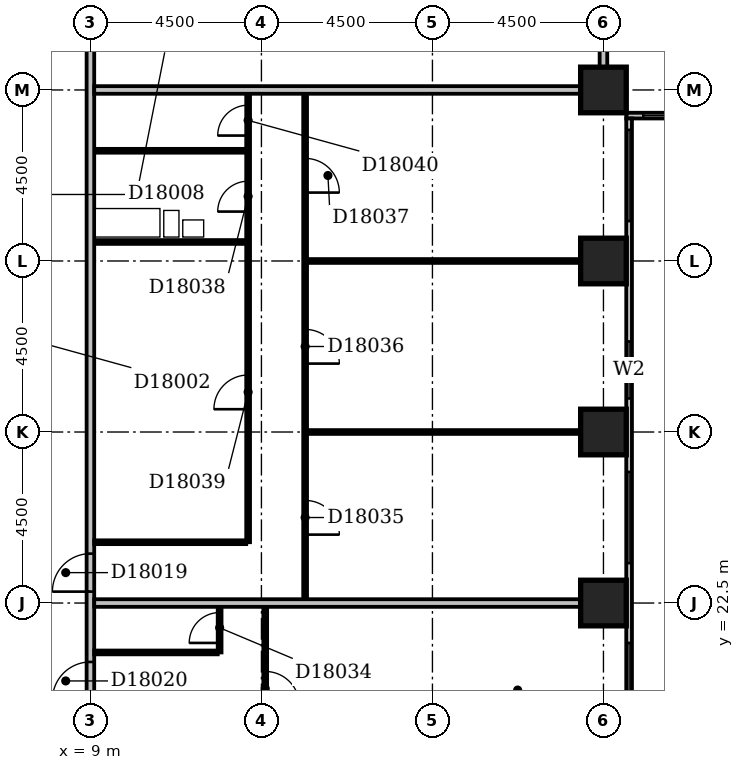
"""IFC4 building model, lengths in metres.
Left out: names, types, materials, properties, quantities, classifications, styles, units other than length and angle.
Written with IfcOpenShell. Run it as: python <this file> out.ifc"""

import sys

from ifc_helpers import new_model, si_unit, direction, frame, frame_2d, origin, origin_2d, place, context, subcontext, project, spatial, rectangle, extrude, element, fill, save


model = new_model("IFC4")
c1 = context("Model", 3, precision=1e-05, world=origin(), true_north=direction((0.0, 1.0)))
c2 = subcontext(c1, "Body", "Model", "MODEL_VIEW")
j1 = project(units=[si_unit("LENGTHUNIT", "METRE"), si_unit("PLANEANGLEUNIT", "RADIAN")], contexts=[c1])
p1 = place(None, origin())
s1 = spatial("IfcSite", under=j1, at=p1, CompositionType="ELEMENT")
p2 = place(p1, origin())
s2 = spatial("IfcBuilding", under=s1, at=p2, CompositionType="ELEMENT")
p3 = place(p2, frame((0.0, 0.0, 75.8)))
s3 = spatial("IfcBuildingStorey", under=s2, at=p3, CompositionType="ELEMENT", Elevation=75.8)
for number, where, z_axis, x_axis in (
    (1, (22.5, 22.5, -0.3), (0.0, 0.0, 1.0), (1.0, 0.0, 0.0)),
    (2, (22.5, 27.0, -0.3), (0.0, 0.0, 1.0), (1.0, 0.0, 0.0)),
    (3, (22.5, 31.5, -0.3), (0.0, 0.0, 1.0), (1.0, 0.0, 0.0)),
    (4, (22.5, 36.0, -0.3), (0.0, 0.0, 1.0), (1.0, 0.0, 0.0)),
):
    element("IfcColumn", number, at=place(p3, frame(where, z_axis=z_axis, x_axis=x_axis)), inside=s3, PredefinedType="COLUMN", context=c2, shape_type="SweptSolid", body=[
        extrude(rectangle(XDim=1.2, YDim=1.2, at=origin_2d()), origin(), (0.0, 0.0, 1.0), 3.6),
    ])
p4 = place(p3, frame((23.175, 17.4, 0.0), z_axis=(0.0, 0.0, 1.0), x_axis=(0.0, 1.0, 0.0)))
e5 = element("IfcWall", 5, at=p4, inside=s3, PredefinedType="STANDARD", context=c2, shape_type="SweptSolid", body=[
    extrude(rectangle(XDim=17.85, YDim=0.15, at=frame_2d((8.925, 0.0))), origin(), (0.0, 0.0, 1.0), 2.7),
])
p5 = place(p4, frame((1.65, 0.0, 0.6)))
e6 = element("IfcOpeningElement", 6, at=p5, cuts=e5, PredefinedType="OPENING", context=c2, shape_type="SweptSolid", body=[
    extrude(rectangle(XDim=2.4, YDim=1.8, at=frame_2d((1.2, 0.9))), frame((0.0, 0.087, 0.0), z_axis=(0.0, -1.0, 0.0), x_axis=(1.0, 0.0, 0.0)), (0.0, 0.0, 1.0), 0.174),
])
p6 = place(p4, frame((6.15, 0.0, 0.6)))
e7 = element("IfcOpeningElement", 7, at=p6, cuts=e5, PredefinedType="OPENING", context=c2, shape_type="SweptSolid", body=[
    extrude(rectangle(XDim=2.4, YDim=1.8, at=frame_2d((1.2, 0.9))), frame((0.0, 0.087, 0.0), z_axis=(0.0, -1.0, 0.0), x_axis=(1.0, 0.0, 0.0)), (0.0, 0.0, 1.0), 0.174),
])
p7 = place(p4, frame((10.483, 0.0, 0.6)))
e8 = element("IfcOpeningElement", 8, at=p7, cuts=e5, PredefinedType="OPENING", context=c2, shape_type="SweptSolid", body=[
    extrude(rectangle(XDim=1.5, YDim=1.8, at=frame_2d((0.75, 0.9))), frame((0.0, 0.087, 0.0), z_axis=(0.0, -1.0, 0.0), x_axis=(1.0, 0.0, 0.0)), (0.0, 0.0, 1.0), 0.174),
])
p8 = place(p4, frame((15.15, 0.0, 0.6)))
e9 = element("IfcOpeningElement", 9, at=p8, cuts=e5, PredefinedType="OPENING", context=c2, shape_type="SweptSolid", body=[
    extrude(rectangle(XDim=2.4, YDim=1.8, at=frame_2d((1.2, 0.9))), frame((0.0, 0.087, 0.0), z_axis=(0.0, -1.0, 0.0), x_axis=(1.0, 0.0, 0.0)), (0.0, 0.0, 1.0), 0.174),
])
p9 = place(p3, frame((23.1, 35.325, 0.0), z_axis=(0.0, 0.0, 1.0), x_axis=(1.0, 0.0, 0.0)))
e10 = element("IfcWall", 10, at=p9, inside=s3, PredefinedType="STANDARD", context=c2, shape_type="SweptSolid", body=[
    extrude(rectangle(XDim=45.15, YDim=0.15, at=frame_2d((22.575, 0.0))), origin(), (0.0, 0.0, 1.0), 2.7),
])
p10 = place(p9, frame((0.45, 0.0, 0.6)))
e11 = element("IfcOpeningElement", 11, at=p10, cuts=e10, PredefinedType="OPENING", context=c2, shape_type="SweptSolid", body=[
    extrude(rectangle(XDim=2.4, YDim=1.8, at=frame_2d((1.2, 0.9))), frame((0.0, 0.087, 0.0), z_axis=(0.0, -1.0, 0.0), x_axis=(1.0, 0.0, 0.0)), (0.0, 0.0, 1.0), 0.174),
])
p11 = place(p9, frame((4.95, 0.0, 0.6)))
e12 = element("IfcOpeningElement", 12, at=p11, cuts=e10, PredefinedType="OPENING", context=c2, shape_type="SweptSolid", body=[
    extrude(rectangle(XDim=2.4, YDim=1.8, at=frame_2d((1.2, 0.9))), frame((0.0, 0.087, 0.0), z_axis=(0.0, -1.0, 0.0), x_axis=(1.0, 0.0, 0.0)), (0.0, 0.0, 1.0), 0.174),
])
p12 = place(p9, frame((10.548, 0.0, 0.6)))
e13 = element("IfcOpeningElement", 13, at=p12, cuts=e10, PredefinedType="OPENING", context=c2, shape_type="SweptSolid", body=[
    extrude(rectangle(XDim=1.5, YDim=1.8, at=frame_2d((0.75, 0.9))), frame((0.0, 0.087, 0.0), z_axis=(0.0, -1.0, 0.0), x_axis=(1.0, 0.0, 0.0)), (0.0, 0.0, 1.0), 0.174),
])
p13 = place(p9, frame((13.71, 0.0, 0.6)))
e14 = element("IfcOpeningElement", 14, at=p13, cuts=e10, PredefinedType="OPENING", context=c2, shape_type="SweptSolid", body=[
    extrude(rectangle(XDim=1.8, YDim=1.8, at=frame_2d((0.9, 0.9))), frame((0.0, 0.087, 0.0), z_axis=(0.0, -1.0, 0.0), x_axis=(1.0, 0.0, 0.0)), (0.0, 0.0, 1.0), 0.174),
])
p14 = place(p9, frame((18.45, 0.0, 0.6)))
e15 = element("IfcOpeningElement", 15, at=p14, cuts=e10, PredefinedType="OPENING", context=c2, shape_type="SweptSolid", body=[
    extrude(rectangle(XDim=2.4, YDim=1.8, at=frame_2d((1.2, 0.9))), frame((0.0, 0.087, 0.0), z_axis=(0.0, -1.0, 0.0), x_axis=(1.0, 0.0, 0.0)), (0.0, 0.0, 1.0), 0.174),
])
p15 = place(p9, frame((22.95, 0.0, 0.6)))
e16 = element("IfcOpeningElement", 16, at=p15, cuts=e10, PredefinedType="OPENING", context=c2, shape_type="SweptSolid", body=[
    extrude(rectangle(XDim=2.4, YDim=1.8, at=frame_2d((1.2, 0.9))), frame((0.0, 0.087, 0.0), z_axis=(0.0, -1.0, 0.0), x_axis=(1.0, 0.0, 0.0)), (0.0, 0.0, 1.0), 0.174),
])
p16 = place(p9, frame((27.45, 0.0, 0.6)))
e17 = element("IfcOpeningElement", 17, at=p16, cuts=e10, PredefinedType="OPENING", context=c2, shape_type="SweptSolid", body=[
    extrude(rectangle(XDim=2.4, YDim=1.8, at=frame_2d((1.2, 0.9))), frame((0.0, 0.087, 0.0), z_axis=(0.0, -1.0, 0.0), x_axis=(1.0, 0.0, 0.0)), (0.0, 0.0, 1.0), 0.174),
])
p17 = place(p9, frame((31.95, 0.0, 0.6)))
e18 = element("IfcOpeningElement", 18, at=p17, cuts=e10, PredefinedType="OPENING", context=c2, shape_type="SweptSolid", body=[
    extrude(rectangle(XDim=2.4, YDim=1.8, at=frame_2d((1.2, 0.9))), frame((0.0, 0.087, 0.0), z_axis=(0.0, -1.0, 0.0), x_axis=(1.0, 0.0, 0.0)), (0.0, 0.0, 1.0), 0.174),
])
p18 = place(p9, frame((36.331, 0.0, 0.6)))
e19 = element("IfcOpeningElement", 19, at=p18, cuts=e10, PredefinedType="OPENING", context=c2, shape_type="SweptSolid", body=[
    extrude(rectangle(XDim=2.1, YDim=1.8, at=frame_2d((1.05, 0.9))), frame((0.0, 0.087, 0.0), z_axis=(0.0, -1.0, 0.0), x_axis=(1.0, 0.0, 0.0)), (0.0, 0.0, 1.0), 0.174),
])
p19 = place(p9, frame((40.95, 0.0, 0.6)))
e20 = element("IfcOpeningElement", 20, at=p19, cuts=e10, PredefinedType="OPENING", context=c2, shape_type="SweptSolid", body=[
    extrude(rectangle(XDim=2.4, YDim=1.8, at=frame_2d((1.2, 0.9))), frame((0.0, 0.087, 0.0), z_axis=(0.0, -1.0, 0.0), x_axis=(1.0, 0.0, 0.0)), (0.0, 0.0, 1.0), 0.174),
])
p20 = place(p3, frame((9.0, 5.0, 0.0), z_axis=(0.0, 0.0, 1.0), x_axis=(0.0, 1.0, 0.0)))
e21 = element("IfcWall", 21, at=p20, inside=s3, PredefinedType="PARTITIONING", context=c2, shape_type="SweptSolid", body=[
    extrude(rectangle(XDim=44.5, YDim=0.2, at=frame_2d((22.25, 0.0))), origin(), (0.0, 0.0, 1.0), 3.3),
])
p21 = place(p20, frame((17.8, 0.0, 0.0)))
e22 = element("IfcOpeningElement", 22, at=p21, cuts=e21, PredefinedType="OPENING", context=c2, shape_type="SweptSolid", body=[
    extrude(rectangle(XDim=1.0, YDim=2.1, at=frame_2d((0.5, 1.05))), frame((0.0, 0.112, 0.0), z_axis=(0.0, -1.0, 0.0), x_axis=(1.0, 0.0, 0.0)), (0.0, 0.0, 1.0), 0.224),
])
p22 = place(p20, frame((14.95, 0.0, 0.0)))
e23 = element("IfcOpeningElement", 23, at=p22, cuts=e21, PredefinedType="OPENING", context=c2, shape_type="SweptSolid", body=[
    extrude(rectangle(XDim=1.0, YDim=2.1, at=frame_2d((0.5, 1.05))), frame((0.0, 0.112, 0.0), z_axis=(0.0, -1.0, 0.0), x_axis=(1.0, 0.0, 0.0)), (0.0, 0.0, 1.0), 0.224),
])
p23 = place(p20, frame((10.45, 0.0, 0.0)))
e24 = element("IfcOpeningElement", 24, at=p23, cuts=e21, PredefinedType="OPENING", context=c2, shape_type="SweptSolid", body=[
    extrude(rectangle(XDim=1.0, YDim=2.1, at=frame_2d((0.5, 1.05))), frame((0.0, 0.112, 0.0), z_axis=(0.0, -1.0, 0.0), x_axis=(1.0, 0.0, 0.0)), (0.0, 0.0, 1.0), 0.224),
])
p24 = place(p20, frame((5.95, 0.0, 0.0)))
e25 = element("IfcOpeningElement", 25, at=p24, cuts=e21, PredefinedType="OPENING", context=c2, shape_type="SweptSolid", body=[
    extrude(rectangle(XDim=1.0, YDim=2.1, at=frame_2d((0.5, 1.05))), frame((0.0, 0.112, 0.0), z_axis=(0.0, -1.0, 0.0), x_axis=(1.0, 0.0, 0.0)), (0.0, 0.0, 1.0), 0.224),
])
p25 = place(p20, frame((35.0, 0.0, 0.0)))
e26 = element("IfcOpeningElement", 26, at=p25, cuts=e21, PredefinedType="OPENING", context=c2, shape_type="SweptSolid", body=[
    extrude(rectangle(XDim=0.9, YDim=2.1, at=frame_2d((0.45, 1.05))), frame((0.0, 0.112, 0.0), z_axis=(0.0, -1.0, 0.0), x_axis=(1.0, 0.0, 0.0)), (0.0, 0.0, 1.0), 0.224),
])
p26 = place(p20, frame((1.5, 0.0, 0.0)))
e27 = element("IfcOpeningElement", 27, at=p26, cuts=e21, PredefinedType="OPENING", context=c2, shape_type="SweptSolid", body=[
    extrude(rectangle(XDim=0.9, YDim=2.1, at=frame_2d((0.45, 1.05))), frame((0.0, 0.112, 0.0), z_axis=(0.0, -1.0, 0.0), x_axis=(1.0, 0.0, 0.0)), (0.0, 0.0, 1.0), 0.224),
])
p27 = place(p3, frame((13.6, 18.1, 0.0), z_axis=(0.0, 0.0, 1.0), x_axis=(0.0, 1.0, 0.0)))
e28 = element("IfcWall", 28, at=p27, inside=s3, PredefinedType="PARTITIONING", context=c2, shape_type="SweptSolid", body=[
    extrude(rectangle(XDim=4.3, YDim=0.1, at=frame_2d((2.15, 0.0))), origin(), (0.0, 0.0, 1.0), 3.3),
])
p28 = place(p27, frame((1.7, 0.0, 0.0)))
e29 = element("IfcOpeningElement", 29, at=p28, cuts=e28, PredefinedType="OPENING", context=c2, shape_type="SweptSolid", body=[
    extrude(rectangle(XDim=0.9, YDim=2.1, at=frame_2d((0.45, 1.05))), frame((0.0, 0.062, 0.0), z_axis=(0.0, -1.0, 0.0), x_axis=(1.0, 0.0, 0.0)), (0.0, 0.0, 1.0), 0.124),
])
p29 = place(p3, frame((9.1, 21.2, 0.0), z_axis=(0.0, 0.0, 1.0), x_axis=(1.0, 0.0, 0.0)))
e30 = element("IfcWall", 30, at=p29, inside=s3, PredefinedType="PARTITIONING", context=c2, shape_type="SweptSolid", body=[
    extrude(rectangle(XDim=3.25, YDim=0.1, at=frame_2d((1.625, 0.0))), origin(), (0.0, 0.0, 1.0), 3.3),
])
p30 = place(p3, frame((12.4, 21.2, 0.0), z_axis=(0.0, 0.0, 1.0), x_axis=(0.0, 1.0, 0.0)))
e31 = element("IfcWall", 31, at=p30, inside=s3, PredefinedType="PARTITIONING", context=c2, shape_type="SweptSolid", body=[
    extrude(rectangle(XDim=1.2, YDim=0.1, at=frame_2d((0.6, 0.0))), origin(), (0.0, 0.0, 1.0), 3.3),
])
p31 = place(p30, frame((0.25, 0.0, 0.0)))
e32 = element("IfcOpeningElement", 32, at=p31, cuts=e31, PredefinedType="OPENING", context=c2, shape_type="SweptSolid", body=[
    extrude(rectangle(XDim=0.8, YDim=2.1, at=frame_2d((0.4, 1.05))), frame((0.0, 0.062, 0.0), z_axis=(0.0, -1.0, 0.0), x_axis=(1.0, 0.0, 0.0)), (0.0, 0.0, 1.0), 0.124),
])
p32 = place(p3, frame((9.1, 22.5, 0.0), z_axis=(0.0, 0.0, 1.0), x_axis=(1.0, 0.0, 0.0)))
e33 = element("IfcWall", 33, at=p32, inside=s3, PredefinedType="PARTITIONING", context=c2, shape_type="SweptSolid", body=[
    extrude(rectangle(XDim=12.8, YDim=0.2, at=frame_2d((6.4, 0.0))), origin(), (0.0, 0.0, 1.0), 3.3),
])
p33 = place(p3, frame((14.65, 22.6, 0.0), z_axis=(0.0, 0.0, 1.0), x_axis=(0.0, 1.0, 0.0)))
e34 = element("IfcWall", 34, at=p33, inside=s3, PredefinedType="PARTITIONING", context=c2, shape_type="SweptSolid", body=[
    extrude(rectangle(XDim=13.3, YDim=0.1, at=frame_2d((6.65, 0.0))), origin(), (0.0, 0.0, 1.0), 3.3),
])
p34 = place(p33, frame((1.7, 0.0, 0.0)))
e35 = element("IfcOpeningElement", 35, at=p34, cuts=e34, PredefinedType="OPENING", context=c2, shape_type="SweptSolid", body=[
    extrude(rectangle(XDim=0.9, YDim=2.1, at=frame_2d((0.45, 1.05))), frame((0.0, 0.062, 0.0), z_axis=(0.0, -1.0, 0.0), x_axis=(1.0, 0.0, 0.0)), (0.0, 0.0, 1.0), 0.124),
])
p35 = place(p33, frame((6.2, 0.0, 0.0)))
e36 = element("IfcOpeningElement", 36, at=p35, cuts=e34, PredefinedType="OPENING", context=c2, shape_type="SweptSolid", body=[
    extrude(rectangle(XDim=0.9, YDim=2.1, at=frame_2d((0.45, 1.05))), frame((0.0, 0.062, 0.0), z_axis=(0.0, -1.0, 0.0), x_axis=(1.0, 0.0, 0.0)), (0.0, 0.0, 1.0), 0.124),
])
p36 = place(p33, frame((10.7, 0.0, 0.0)))
e37 = element("IfcOpeningElement", 37, at=p36, cuts=e34, PredefinedType="OPENING", context=c2, shape_type="SweptSolid", body=[
    extrude(rectangle(XDim=0.9, YDim=2.1, at=frame_2d((0.45, 1.05))), frame((0.0, 0.062, 0.0), z_axis=(0.0, -1.0, 0.0), x_axis=(1.0, 0.0, 0.0)), (0.0, 0.0, 1.0), 0.124),
])
p37 = place(p3, frame((9.1, 24.1, 0.0), z_axis=(0.0, 0.0, 1.0), x_axis=(1.0, 0.0, 0.0)))
e38 = element("IfcWall", 38, at=p37, inside=s3, PredefinedType="PARTITIONING", context=c2, shape_type="SweptSolid", body=[
    extrude(rectangle(XDim=4.0, YDim=0.1, at=frame_2d((2.0, 0.0))), origin(), (0.0, 0.0, 1.0), 3.3),
])
p38 = place(p3, frame((13.15, 24.1, 0.0), z_axis=(0.0, 0.0, 1.0), x_axis=(0.0, 1.0, 0.0)))
e39 = element("IfcWall", 39, at=p38, inside=s3, PredefinedType="PARTITIONING", context=c2, shape_type="SweptSolid", body=[
    extrude(rectangle(XDim=11.8, YDim=0.1, at=frame_2d((5.9, 0.0))), origin(), (0.0, 0.0, 1.0), 3.3),
])
p39 = place(p38, frame((8.7, 0.0, 0.0)))
e40 = element("IfcOpeningElement", 40, at=p39, cuts=e39, PredefinedType="OPENING", context=c2, shape_type="SweptSolid", body=[
    extrude(rectangle(XDim=0.8, YDim=2.1, at=frame_2d((0.4, 1.05))), frame((0.0, 0.062, 0.0), z_axis=(0.0, -1.0, 0.0), x_axis=(1.0, 0.0, 0.0)), (0.0, 0.0, 1.0), 0.124),
])
p40 = place(p38, frame((3.5, 0.0, 0.0)))
e41 = element("IfcOpeningElement", 41, at=p40, cuts=e39, PredefinedType="OPENING", context=c2, shape_type="SweptSolid", body=[
    extrude(rectangle(XDim=0.9, YDim=2.1, at=frame_2d((0.45, 1.05))), frame((0.0, 0.062, 0.0), z_axis=(0.0, -1.0, 0.0), x_axis=(1.0, 0.0, 0.0)), (0.0, 0.0, 1.0), 0.124),
])
p41 = place(p38, frame((10.7, 0.0, 0.0)))
e42 = element("IfcOpeningElement", 42, at=p41, cuts=e39, PredefinedType="OPENING", context=c2, shape_type="SweptSolid", body=[
    extrude(rectangle(XDim=0.8, YDim=2.1, at=frame_2d((0.4, 1.05))), frame((0.0, 0.062, 0.0), z_axis=(0.0, -1.0, 0.0), x_axis=(1.0, 0.0, 0.0)), (0.0, 0.0, 1.0), 0.124),
])
p42 = place(p3, frame((14.7, 27.0, 0.0), z_axis=(0.0, 0.0, 1.0), x_axis=(1.0, 0.0, 0.0)))
e43 = element("IfcWall", 43, at=p42, inside=s3, PredefinedType="PARTITIONING", context=c2, shape_type="SweptSolid", body=[
    extrude(rectangle(XDim=7.2, YDim=0.1, at=frame_2d((3.6, 0.0))), origin(), (0.0, 0.0, 1.0), 2.7),
])
p43 = place(p3, frame((14.7, 31.5, 0.0), z_axis=(0.0, 0.0, 1.0), x_axis=(1.0, 0.0, 0.0)))
e44 = element("IfcWall", 44, at=p43, inside=s3, PredefinedType="PARTITIONING", context=c2, shape_type="SweptSolid", body=[
    extrude(rectangle(XDim=7.2, YDim=0.1, at=frame_2d((3.6, 0.0))), origin(), (0.0, 0.0, 1.0), 3.3),
])
for number, where, z_axis, x_axis in (
    (45, (9.1, 32.0, 0.0), (0.0, 0.0, 1.0), (1.0, 0.0, 0.0)),
    (46, (9.1, 34.4, 0.0), (0.0, 0.0, 1.0), (1.0, 0.0, 0.0)),
):
    element("IfcWall", number, at=place(p3, frame(where, z_axis=z_axis, x_axis=x_axis)), inside=s3, PredefinedType="PLUMBINGWALL", context=c2, shape_type="SweptSolid", body=[
        extrude(rectangle(XDim=4.0, YDim=0.1, at=frame_2d((2.0, 0.0))), origin(), (0.0, 0.0, 1.0), 3.3),
    ])
p44 = place(p3, frame((9.1, 36.0, 0.0), z_axis=(0.0, 0.0, 1.0), x_axis=(1.0, 0.0, 0.0)))
e47 = element("IfcWall", 47, at=p44, inside=s3, PredefinedType="PARTITIONING", context=c2, shape_type="SweptSolid", body=[
    extrude(rectangle(XDim=12.8, YDim=0.2, at=frame_2d((6.4, 0.0))), origin(), (0.0, 0.0, 1.0), 2.4),
])
p45 = place(p3, frame((22.5, 36.6, 0.0), z_axis=(0.0, 0.0, 1.0), x_axis=(0.0, 1.0, 0.0)))
e48 = element("IfcWall", 48, at=p45, inside=s3, PredefinedType="PARTITIONING", context=c2, shape_type="SweptSolid", body=[
    extrude(rectangle(XDim=12.8, YDim=0.2, at=frame_2d((6.4, 0.0))), origin(), (0.0, 0.0, 1.0), 3.3),
])
p46 = place(p5, origin())
e49 = element("IfcWindow", 49, at=p46, inside=s3, PartitioningType="SINGLE_PANEL", PredefinedType="WINDOW", context=c2, shape_type="SweptSolid", body=[
    extrude(rectangle(XDim=2.4, YDim=1.8, at=frame_2d((1.2, 0.9))), frame((0.0, 0.03, 0.0), z_axis=(0.0, -1.0, 0.0), x_axis=(1.0, 0.0, 0.0)), (0.0, 0.0, 1.0), 0.06),
])
fill(e6, e49)
p47 = place(p6, origin())
e50 = element("IfcWindow", 50, at=p47, inside=s3, PartitioningType="SINGLE_PANEL", PredefinedType="WINDOW", context=c2, shape_type="SweptSolid", body=[
    extrude(rectangle(XDim=2.4, YDim=1.8, at=frame_2d((1.2, 0.9))), frame((0.0, 0.03, 0.0), z_axis=(0.0, -1.0, 0.0), x_axis=(1.0, 0.0, 0.0)), (0.0, 0.0, 1.0), 0.06),
])
fill(e7, e50)
p48 = place(p7, origin())
e51 = element("IfcWindow", 51, at=p48, inside=s3, PartitioningType="SINGLE_PANEL", PredefinedType="WINDOW", context=c2, shape_type="SweptSolid", body=[
    extrude(rectangle(XDim=1.5, YDim=1.8, at=frame_2d((0.75, 0.9))), frame((0.0, 0.03, 0.0), z_axis=(0.0, -1.0, 0.0), x_axis=(1.0, 0.0, 0.0)), (0.0, 0.0, 1.0), 0.06),
])
fill(e8, e51)
p49 = place(p8, origin())
e52 = element("IfcWindow", 52, at=p49, inside=s3, PartitioningType="SINGLE_PANEL", PredefinedType="WINDOW", context=c2, shape_type="SweptSolid", body=[
    extrude(rectangle(XDim=2.4, YDim=1.8, at=frame_2d((1.2, 0.9))), frame((0.0, 0.03, 0.0), z_axis=(0.0, -1.0, 0.0), x_axis=(1.0, 0.0, 0.0)), (0.0, 0.0, 1.0), 0.06),
])
fill(e9, e52)
p50 = place(p10, origin())
e53 = element("IfcWindow", 53, at=p50, inside=s3, PartitioningType="SINGLE_PANEL", PredefinedType="WINDOW", context=c2, shape_type="SweptSolid", body=[
    extrude(rectangle(XDim=2.4, YDim=1.8, at=frame_2d((1.2, 0.9))), frame((0.0, 0.03, 0.0), z_axis=(0.0, -1.0, 0.0), x_axis=(1.0, 0.0, 0.0)), (0.0, 0.0, 1.0), 0.06),
])
fill(e11, e53)
p51 = place(p21, origin())
e54 = element("IfcDoor", 54, at=p51, inside=s3, OperationType="SINGLE_SWING_LEFT", PredefinedType="DOOR", context=c2, shape_type="SweptSolid", body=[
    extrude(rectangle(XDim=1.0, YDim=2.1, at=frame_2d((0.5, 1.05))), frame((0.0, 0.025, 0.0), z_axis=(0.0, -1.0, 0.0), x_axis=(1.0, 0.0, 0.0)), (0.0, 0.0, 1.0), 0.05),
])
fill(e22, e54)
p52 = place(p22, origin())
e55 = element("IfcDoor", 55, at=p52, inside=s3, OperationType="SINGLE_SWING_LEFT", PredefinedType="DOOR", context=c2, shape_type="SweptSolid", body=[
    extrude(rectangle(XDim=1.0, YDim=2.1, at=frame_2d((0.5, 1.05))), frame((0.0, 0.025, 0.0), z_axis=(0.0, -1.0, 0.0), x_axis=(1.0, 0.0, 0.0)), (0.0, 0.0, 1.0), 0.05),
])
fill(e23, e55)
p53 = place(p28, frame((0.9, 0.0, 0.0), z_axis=(0.0, 0.0, 1.0), x_axis=(-1.0, 0.0, 0.0)))
e56 = element("IfcDoor", 56, at=p53, inside=s3, OperationType="SINGLE_SWING_RIGHT", PredefinedType="DOOR", context=c2, shape_type="SweptSolid", body=[
    extrude(rectangle(XDim=0.9, YDim=2.1, at=frame_2d((0.45, 1.05))), frame((0.0, 0.025, 0.0), z_axis=(0.0, -1.0, 0.0), x_axis=(1.0, 0.0, 0.0)), (0.0, 0.0, 1.0), 0.05),
])
fill(e29, e56)
p54 = place(p31, origin())
e57 = element("IfcDoor", 57, at=p54, inside=s3, OperationType="SINGLE_SWING_LEFT", PredefinedType="DOOR", context=c2, shape_type="SweptSolid", body=[
    extrude(rectangle(XDim=0.8, YDim=2.1, at=frame_2d((0.4, 1.05))), frame((0.0, 0.025, 0.0), z_axis=(0.0, -1.0, 0.0), x_axis=(1.0, 0.0, 0.0)), (0.0, 0.0, 1.0), 0.05),
])
fill(e32, e57)
p55 = place(p34, frame((0.9, 0.0, 0.0), z_axis=(0.0, 0.0, 1.0), x_axis=(-1.0, 0.0, 0.0)))
e58 = element("IfcDoor", 58, at=p55, inside=s3, OperationType="SINGLE_SWING_RIGHT", PredefinedType="DOOR", context=c2, shape_type="SweptSolid", body=[
    extrude(rectangle(XDim=0.9, YDim=2.1, at=frame_2d((0.45, 1.05))), frame((0.0, 0.025, 0.0), z_axis=(0.0, -1.0, 0.0), x_axis=(1.0, 0.0, 0.0)), (0.0, 0.0, 1.0), 0.05),
])
fill(e35, e58)
p56 = place(p35, frame((0.9, 0.0, 0.0), z_axis=(0.0, 0.0, 1.0), x_axis=(-1.0, 0.0, 0.0)))
e59 = element("IfcDoor", 59, at=p56, inside=s3, OperationType="SINGLE_SWING_RIGHT", PredefinedType="DOOR", context=c2, shape_type="SweptSolid", body=[
    extrude(rectangle(XDim=0.9, YDim=2.1, at=frame_2d((0.45, 1.05))), frame((0.0, 0.025, 0.0), z_axis=(0.0, -1.0, 0.0), x_axis=(1.0, 0.0, 0.0)), (0.0, 0.0, 1.0), 0.05),
])
fill(e36, e59)
p57 = place(p36, frame((0.9, 0.0, 0.0), z_axis=(0.0, 0.0, 1.0), x_axis=(-1.0, 0.0, 0.0)))
e60 = element("IfcDoor", 60, at=p57, inside=s3, OperationType="SINGLE_SWING_RIGHT", PredefinedType="DOOR", context=c2, shape_type="SweptSolid", body=[
    extrude(rectangle(XDim=0.9, YDim=2.1, at=frame_2d((0.45, 1.05))), frame((0.0, 0.025, 0.0), z_axis=(0.0, -1.0, 0.0), x_axis=(1.0, 0.0, 0.0)), (0.0, 0.0, 1.0), 0.05),
])
fill(e37, e60)
p58 = place(p39, origin())
e61 = element("IfcDoor", 61, at=p58, inside=s3, OperationType="SINGLE_SWING_LEFT", PredefinedType="DOOR", context=c2, shape_type="SweptSolid", body=[
    extrude(rectangle(XDim=0.8, YDim=2.1, at=frame_2d((0.4, 1.05))), frame((0.0, 0.025, 0.0), z_axis=(0.0, -1.0, 0.0), x_axis=(1.0, 0.0, 0.0)), (0.0, 0.0, 1.0), 0.05),
])
fill(e40, e61)
p59 = place(p40, origin())
e62 = element("IfcDoor", 62, at=p59, inside=s3, OperationType="SINGLE_SWING_LEFT", PredefinedType="DOOR", context=c2, shape_type="SweptSolid", body=[
    extrude(rectangle(XDim=0.9, YDim=2.1, at=frame_2d((0.45, 1.05))), frame((0.0, 0.025, 0.0), z_axis=(0.0, -1.0, 0.0), x_axis=(1.0, 0.0, 0.0)), (0.0, 0.0, 1.0), 0.05),
])
fill(e41, e62)
p60 = place(p41, origin())
e63 = element("IfcDoor", 63, at=p60, inside=s3, OperationType="SINGLE_SWING_LEFT", PredefinedType="DOOR", context=c2, shape_type="SweptSolid", body=[
    extrude(rectangle(XDim=0.8, YDim=2.1, at=frame_2d((0.4, 1.05))), frame((0.0, 0.025, 0.0), z_axis=(0.0, -1.0, 0.0), x_axis=(1.0, 0.0, 0.0)), (0.0, 0.0, 1.0), 0.05),
])
fill(e42, e63)
save(model, sys.argv[1])
